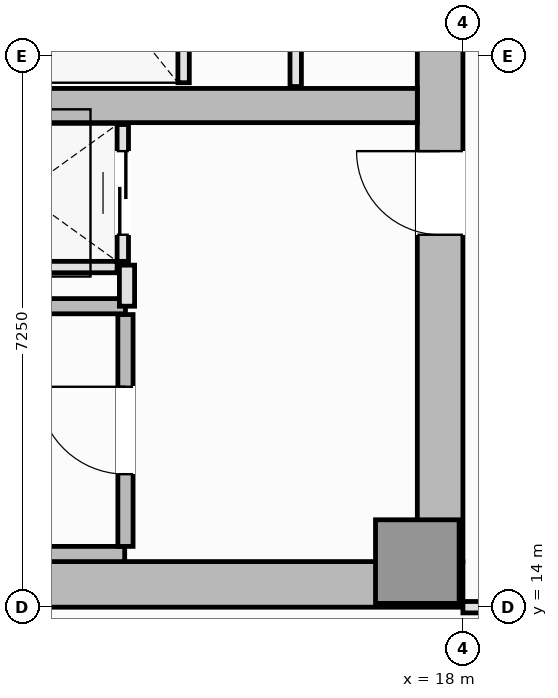
"""IFC4 building model, lengths in metres.
Left out: names, types, materials, properties, quantities, classifications, styles, units other than length and angle.
Written with IfcOpenShell. Run it as: python <this file> out.ifc"""

import sys

from ifc_helpers import new_model, si_unit, direction, frame, frame_2d, origin, origin_2d, place, context, subcontext, project, spatial, rectangle, extrude, element, fill, save


model = new_model("IFC4")
c1 = context("Model", 3, precision=1e-05, world=origin(), true_north=direction((0.0, 1.0)))
c2 = subcontext(c1, "Body", "Model", "MODEL_VIEW")
j1 = project(units=[si_unit("LENGTHUNIT", "METRE"), si_unit("PLANEANGLEUNIT", "RADIAN")], contexts=[c1])
p1 = place(None, origin())
s1 = spatial("IfcSite", under=j1, at=p1, CompositionType="ELEMENT")
p2 = place(p1, origin())
s2 = spatial("IfcBuilding", under=s1, at=p2, CompositionType="ELEMENT")
p3 = place(p2, frame((0.0, 0.0, 137.75)))
s3 = spatial("IfcBuildingStorey", under=s2, at=p3, CompositionType="ELEMENT", Elevation=137.75)
p4 = place(p3, frame((4.5, 14.3, 0.0), z_axis=(0.0, 0.0, 1.0), x_axis=(1.0, 0.0, 0.0)))
e1 = element("IfcWall", 1, at=p4, inside=s3, PredefinedType="SHEAR", context=c2, shape_type="SweptSolid", body=[
    extrude(rectangle(XDim=13.5, YDim=0.6, at=frame_2d((6.75, 0.0))), origin(), (0.0, 0.0, 1.0), 3.55),
])
p5 = place(p3, frame((17.7, 14.6, 0.0), z_axis=(0.0, 0.0, 1.0), x_axis=(0.0, 1.0, 0.0)))
e2 = element("IfcWall", 2, at=p5, inside=s3, PredefinedType="SHEAR", context=c2, shape_type="SweptSolid", body=[
    extrude(rectangle(XDim=8.85, YDim=0.6, at=frame_2d((4.425, 0.0))), origin(), (0.0, 0.0, 1.0), 3.55),
])
p6 = place(p5, frame((4.3, 0.0, 0.0)))
e3 = element("IfcOpeningElement", 3, at=p6, cuts=e2, PredefinedType="OPENING", context=c2, shape_type="SweptSolid", body=[
    extrude(rectangle(XDim=1.1, YDim=2.15, at=frame_2d((0.55, 1.075))), frame((0.0, 0.31, 0.0), z_axis=(0.0, -1.0, 0.0), x_axis=(1.0, 0.0, 0.0)), (0.0, 0.0, 1.0), 0.62),
])
p7 = place(p3, frame((5.1, 20.6, 0.0), z_axis=(0.0, 0.0, 1.0), x_axis=(1.0, 0.0, 0.0)))
e4 = element("IfcWall", 4, at=p7, inside=s3, PredefinedType="SHEAR", context=c2, shape_type="SweptSolid", body=[
    extrude(rectangle(XDim=12.3, YDim=0.45, at=frame_2d((6.15, 0.0))), origin(), (0.0, 0.0, 1.0), 3.55),
])
p8 = place(p3, frame((17.4, 14.6, 0.0), z_axis=(0.0, 0.0, 1.0), x_axis=(1.0, 0.0, 0.0)))
e5 = element("IfcColumn", 5, at=p8, inside=s3, PredefinedType="PILASTER", context=c2, shape_type="SweptSolid", body=[
    extrude(rectangle(XDim=1.1, YDim=1.1, at=origin_2d()), origin(), (0.0, 0.0, 1.0), 3.55),
])
p9 = place(p3, frame((5.8, 14.7, 0.0), z_axis=(0.0, 0.0, 1.0), x_axis=(1.0, 0.0, 0.0)))
e6 = element("IfcWall", 6, at=p9, inside=s3, PredefinedType="SOLIDWALL", context=c2, shape_type="SweptSolid", body=[
    extrude(rectangle(XDim=7.75, YDim=0.2, at=frame_2d((3.875, 0.0))), origin(), (0.0, 0.0, 1.0), 3.55),
])
p10 = place(p3, frame((5.9, 17.96, 0.0), z_axis=(0.0, 0.0, 1.0), x_axis=(1.0, 0.0, 0.0)))
e7 = element("IfcWall", 7, at=p10, inside=s3, PredefinedType="SOLIDWALL", context=c2, shape_type="SweptSolid", body=[
    extrude(rectangle(XDim=7.66, YDim=0.2, at=frame_2d((3.83, 0.0))), origin(), (0.0, 0.0, 1.0), 3.55),
])
p11 = place(p3, frame((13.56, 14.8, 0.0), z_axis=(0.0, 0.0, 1.0), x_axis=(0.0, 1.0, 0.0)))
e8 = element("IfcWall", 8, at=p11, inside=s3, PredefinedType="SOLIDWALL", context=c2, shape_type="SweptSolid", body=[
    extrude(rectangle(XDim=3.05, YDim=0.2, at=frame_2d((1.525, 0.0))), origin(), (0.0, 0.0, 1.0), 3.55),
])
p12 = place(p11, frame((0.95, 0.0, 0.0)))
e9 = element("IfcOpeningElement", 9, at=p12, cuts=e8, PredefinedType="OPENING", context=c2, shape_type="SweptSolid", body=[
    extrude(rectangle(XDim=1.15, YDim=2.15, at=frame_2d((0.575, 1.075))), frame((0.0, 0.11, 0.0), z_axis=(0.0, -1.0, 0.0), x_axis=(1.0, 0.0, 0.0)), (0.0, 0.0, 1.0), 0.22),
])
p13 = place(p3, frame((14.325, 20.9, 0.0), z_axis=(0.0, 0.0, 1.0), x_axis=(0.0, 1.0, 0.0)))
e10 = element("IfcWall", 10, at=p13, inside=s3, PredefinedType="PARTITIONING", context=c2, shape_type="SweptSolid", body=[
    extrude(rectangle(XDim=2.55, YDim=0.15, at=frame_2d((1.275, 0.0))), origin(), (0.0, 0.0, 1.0), 3.37),
])
p14 = place(p3, frame((10.95, 18.475, 0.0), z_axis=(0.0, 0.0, 1.0), x_axis=(1.0, 0.0, 0.0)))
e11 = element("IfcWall", 11, at=p14, inside=s3, PredefinedType="PARTITIONING", context=c2, shape_type="SweptSolid", body=[
    extrude(rectangle(XDim=2.5, YDim=0.15, at=frame_2d((1.25, 0.0))), origin(), (0.0, 0.0, 1.0), 3.37),
])
p15 = place(p3, frame((13.525, 18.55, 0.0), z_axis=(0.0, 0.0, 1.0), x_axis=(0.0, 1.0, 0.0)))
e12 = element("IfcWall", 12, at=p15, inside=s3, PredefinedType="PARTITIONING", context=c2, shape_type="SweptSolid", body=[
    extrude(rectangle(XDim=1.8, YDim=0.15, at=frame_2d((0.9, 0.0))), origin(), (0.0, 0.0, 1.0), 3.37),
])
p16 = place(p15, frame((0.35, 0.0, 0.0)))
e13 = element("IfcOpeningElement", 13, at=p16, cuts=e12, PredefinedType="OPENING", context=c2, shape_type="SweptSolid", body=[
    extrude(rectangle(XDim=1.1, YDim=2.2, at=frame_2d((0.55, 1.1))), frame((0.0, 0.085, 0.0), z_axis=(0.0, -1.0, 0.0), x_axis=(1.0, 0.0, 0.0)), (0.0, 0.0, 1.0), 0.17),
])
p17 = place(p3, frame((13.58, 17.96, 0.0), z_axis=(0.0, 0.0, 1.0), x_axis=(0.0, 1.0, 0.0)))
e14 = element("IfcWall", 14, at=p17, inside=s3, PredefinedType="PARTITIONING", context=c2, shape_type="SweptSolid", body=[
    extrude(rectangle(XDim=0.54, YDim=0.2, at=frame_2d((0.27, 0.0))), origin(), (0.0, 0.0, 1.0), 3.37),
])
p18 = place(p3, frame((15.8, 20.85, 0.0), z_axis=(0.0, 0.0, 1.0), x_axis=(0.0, 1.0, 0.0)))
e15 = element("IfcWall", 15, at=p18, inside=s3, PredefinedType="PARTITIONING", context=c2, shape_type="SweptSolid", body=[
    extrude(rectangle(XDim=2.67, YDim=0.15, at=frame_2d((1.335, 0.0))), origin(), (0.0, 0.0, 1.0), 3.37),
])
p19 = place(p3, frame((18.0, 14.0, 0.0), z_axis=(0.0, 0.0, 1.0), x_axis=(1.0, 0.0, 0.0)))
e16 = element("IfcWall", 16, at=p19, inside=s3, PredefinedType="PARTITIONING", context=c2, shape_type="SweptSolid", body=[
    extrude(rectangle(XDim=1.95, YDim=0.15, at=frame_2d((0.975, 0.0))), origin(), (0.0, 0.0, 1.0), 3.37),
])
p20 = place(p19, frame((0.525, 0.0, 0.0)))
e17 = element("IfcOpeningElement", 17, at=p20, cuts=e16, PredefinedType="OPENING", context=c2, shape_type="SweptSolid", body=[
    extrude(rectangle(XDim=0.9, YDim=2.1, at=frame_2d((0.45, 1.05))), frame((0.0, 0.085, 0.0), z_axis=(0.0, -1.0, 0.0), x_axis=(1.0, 0.0, 0.0)), (0.0, 0.0, 1.0), 0.17),
])
p21 = place(p12, origin())
e18 = element("IfcDoor", 18, at=p21, inside=s3, OperationType="SINGLE_SWING_RIGHT", PredefinedType="DOOR", context=c2, shape_type="SweptSolid", body=[
    extrude(rectangle(XDim=1.15, YDim=2.15, at=frame_2d((0.575, 1.075))), frame((0.0, 0.025, 0.0), z_axis=(0.0, -1.0, 0.0), x_axis=(1.0, 0.0, 0.0)), (0.0, 0.0, 1.0), 0.05),
])
fill(e9, e18)
p22 = place(p16, origin())
e19 = element("IfcDoor", 19, at=p22, inside=s3, OperationType="DOUBLE_DOOR_SLIDING", PredefinedType="DOOR", context=c2, shape_type="SweptSolid", body=[
    extrude(rectangle(XDim=1.1, YDim=2.2, at=frame_2d((0.55, 1.1))), frame((0.0, 0.025, 0.0), z_axis=(0.0, -1.0, 0.0), x_axis=(1.0, 0.0, 0.0)), (0.0, 0.0, 1.0), 0.05),
])
fill(e13, e19)
p23 = place(p6, origin())
e20 = element("IfcDoor", 20, at=p23, inside=s3, OperationType="SINGLE_SWING_RIGHT", PredefinedType="DOOR", context=c2, shape_type="SweptSolid", body=[
    extrude(rectangle(XDim=1.1, YDim=2.15, at=frame_2d((0.55, 1.075))), frame((0.0, 0.025, 0.0), z_axis=(0.0, -1.0, 0.0), x_axis=(1.0, 0.0, 0.0)), (0.0, 0.0, 1.0), 0.05),
])
fill(e3, e20)
save(model, sys.argv[1])
